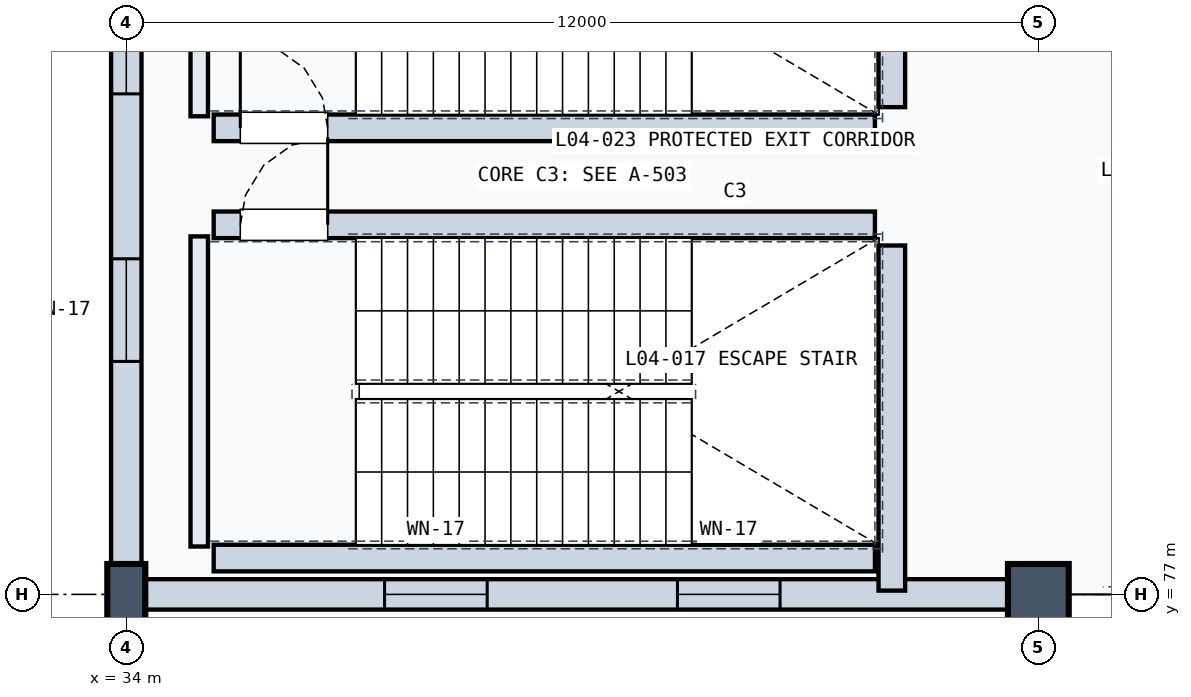
"""IFC4 building model, lengths in metres.
Left out: names, types, materials, properties, quantities, classifications, styles, units other than length and angle.
Written with IfcOpenShell. Run it as: python <this file> out.ifc"""

import sys

from ifc_helpers import new_model, si_unit, direction, frame, frame_2d, origin, origin_2d, place, context, subcontext, project, spatial, rectangle, extrude, element, fill, save


model = new_model("IFC4")
c1 = context("Model", 3, precision=1e-05, world=origin(), true_north=direction((0.0, 1.0)))
c2 = subcontext(c1, "Body", "Model", "MODEL_VIEW")
j1 = project(units=[si_unit("LENGTHUNIT", "METRE"), si_unit("PLANEANGLEUNIT", "RADIAN")], contexts=[c1])
p1 = place(None, origin())
s1 = spatial("IfcSite", under=j1, at=p1, CompositionType="ELEMENT")
p2 = place(p1, origin())
s2 = spatial("IfcBuilding", under=s1, at=p2, CompositionType="ELEMENT")
p3 = place(p2, frame((0.0, 0.0, 19.5)))
s3 = spatial("IfcBuildingStorey", under=s2, at=p3, CompositionType="ELEMENT", Elevation=19.5)
p4 = place(p3, frame((34.0, 77.0, 0.0), z_axis=(0.0, 0.0, 1.0), x_axis=(1.0, 0.0, 0.0)))
e1 = element("IfcColumn", 1, at=p4, inside=s3, PredefinedType="COLUMN", context=c2, shape_type="SweptSolid", body=[
    extrude(rectangle(XDim=0.5, YDim=0.8, at=origin_2d()), origin(), (0.0, 0.0, 1.0), 4.8),
])
p5 = place(p3, frame((46.0, 77.0, 0.0), z_axis=(0.0, 0.0, 1.0), x_axis=(1.0, 0.0, 0.0)))
e2 = element("IfcColumn", 2, at=p5, inside=s3, PredefinedType="COLUMN", context=c2, shape_type="SweptSolid", body=[
    extrude(rectangle(XDim=0.8, YDim=0.8, at=origin_2d()), origin(), (0.0, 0.0, 1.0), 4.8),
])
p6 = place(p3, frame((34.22, 77.0, 0.0), z_axis=(0.0, 0.0, 1.0), x_axis=(1.0, 0.0, 0.0)))
e3 = element("IfcWall", 3, at=p6, inside=s3, PredefinedType="SOLIDWALL", context=c2, shape_type="SweptSolid", body=[
    extrude(rectangle(XDim=11.56, YDim=0.4, at=frame_2d((5.78, 0.0))), origin(), (0.0, 0.0, 1.0), 3.49),
])
p7 = place(p6, frame((3.178, 0.0, 0.8)))
e4 = element("IfcOpeningElement", 4, at=p7, cuts=e3, PredefinedType="OPENING", context=c2, shape_type="SweptSolid", body=[
    extrude(rectangle(XDim=1.35, YDim=2.1, at=frame_2d((0.675, 1.05))), frame((0.0, 0.21, 0.0), z_axis=(0.0, -1.0, 0.0), x_axis=(1.0, 0.0, 0.0)), (0.0, 0.0, 1.0), 0.42),
])
p8 = place(p6, frame((7.032, 0.0, 0.8)))
e5 = element("IfcOpeningElement", 5, at=p8, cuts=e3, PredefinedType="OPENING", context=c2, shape_type="SweptSolid", body=[
    extrude(rectangle(XDim=1.35, YDim=2.1, at=frame_2d((0.675, 1.05))), frame((0.0, 0.21, 0.0), z_axis=(0.0, -1.0, 0.0), x_axis=(1.0, 0.0, 0.0)), (0.0, 0.0, 1.0), 0.42),
])
p9 = place(p3, frame((34.0, 77.22, 0.0), z_axis=(0.0, 0.0, 1.0), x_axis=(0.0, 1.0, 0.0)))
e6 = element("IfcWall", 6, at=p9, inside=s3, PredefinedType="SOLIDWALL", context=c2, shape_type="SweptSolid", body=[
    extrude(rectangle(XDim=10.56, YDim=0.4, at=frame_2d((5.28, 0.0))), origin(), (0.0, 0.0, 1.0), 3.49),
])
p10 = place(p9, frame((2.845, 0.0, 0.8)))
e7 = element("IfcOpeningElement", 7, at=p10, cuts=e6, PredefinedType="OPENING", context=c2, shape_type="SweptSolid", body=[
    extrude(rectangle(XDim=1.35, YDim=2.1, at=frame_2d((0.675, 1.05))), frame((0.0, 0.21, 0.0), z_axis=(0.0, -1.0, 0.0), x_axis=(1.0, 0.0, 0.0)), (0.0, 0.0, 1.0), 0.42),
])
p11 = place(p9, frame((6.365, 0.0, 0.8)))
e8 = element("IfcOpeningElement", 8, at=p11, cuts=e6, PredefinedType="OPENING", context=c2, shape_type="SweptSolid", body=[
    extrude(rectangle(XDim=1.35, YDim=2.1, at=frame_2d((0.675, 1.05))), frame((0.0, 0.21, 0.0), z_axis=(0.0, -1.0, 0.0), x_axis=(1.0, 0.0, 0.0)), (0.0, 0.0, 1.0), 0.42),
])
p12 = place(p3, frame((34.96, 77.63, 0.0), z_axis=(0.0, 0.0, 1.0), x_axis=(0.0, 1.0, 0.0)))
e9 = element("IfcWall", 9, at=p12, inside=s3, PredefinedType="SOLIDWALL", context=c2, shape_type="SweptSolid", body=[
    extrude(rectangle(XDim=4.08, YDim=0.23, at=frame_2d((2.04, 0.0))), origin(), (0.0, 0.0, 1.0), 4.46),
])
p13 = place(p3, frame((44.072, 77.05, 0.0), z_axis=(0.0, 0.0, 1.0), x_axis=(0.0, 1.0, 0.0)))
e10 = element("IfcWall", 10, at=p13, inside=s3, PredefinedType="SOLIDWALL", context=c2, shape_type="SweptSolid", body=[
    extrude(rectangle(XDim=4.54, YDim=0.35, at=frame_2d((2.27, 0.0))), origin(), (0.0, 0.0, 1.0), 4.46),
])
p14 = place(p3, frame((35.15, 77.478, 0.0), z_axis=(0.0, 0.0, 1.0), x_axis=(1.0, 0.0, 0.0)))
e11 = element("IfcWall", 11, at=p14, inside=s3, PredefinedType="SOLIDWALL", context=c2, shape_type="SweptSolid", body=[
    extrude(rectangle(XDim=8.7, YDim=0.35, at=frame_2d((4.35, 0.0))), origin(), (0.0, 0.0, 1.0), 4.46),
])
p15 = place(p3, frame((35.15, 81.862, 0.0), z_axis=(0.0, 0.0, 1.0), x_axis=(1.0, 0.0, 0.0)))
e12 = element("IfcWall", 12, at=p15, inside=s3, PredefinedType="SOLIDWALL", context=c2, shape_type="SweptSolid", body=[
    extrude(rectangle(XDim=8.7, YDim=0.35, at=frame_2d((4.35, 0.0))), origin(), (0.0, 0.0, 1.0), 4.46),
])
p16 = place(p15, frame((0.35, 0.0, 0.0)))
e13 = element("IfcOpeningElement", 13, at=p16, cuts=e12, PredefinedType="OPENING", context=c2, shape_type="SweptSolid", body=[
    extrude(rectangle(XDim=1.15, YDim=2.2, at=frame_2d((0.575, 1.1))), frame((0.0, 0.185, 0.0), z_axis=(0.0, -1.0, 0.0), x_axis=(1.0, 0.0, 0.0)), (0.0, 0.0, 1.0), 0.37),
])
p17 = place(p3, frame((34.96, 83.29, 0.0), z_axis=(0.0, 0.0, 1.0), x_axis=(0.0, 1.0, 0.0)))
e14 = element("IfcWall", 14, at=p17, inside=s3, PredefinedType="SOLIDWALL", context=c2, shape_type="SweptSolid", body=[
    extrude(rectangle(XDim=4.08, YDim=0.23, at=frame_2d((2.04, 0.0))), origin(), (0.0, 0.0, 1.0), 4.46),
])
p18 = place(p3, frame((44.072, 83.41, 0.0), z_axis=(0.0, 0.0, 1.0), x_axis=(0.0, 1.0, 0.0)))
e15 = element("IfcWall", 15, at=p18, inside=s3, PredefinedType="SOLIDWALL", context=c2, shape_type="SweptSolid", body=[
    extrude(rectangle(XDim=3.84, YDim=0.35, at=frame_2d((1.92, 0.0))), origin(), (0.0, 0.0, 1.0), 4.46),
])
p19 = place(p3, frame((35.15, 83.138, 0.0), z_axis=(0.0, 0.0, 1.0), x_axis=(1.0, 0.0, 0.0)))
e16 = element("IfcWall", 16, at=p19, inside=s3, PredefinedType="SOLIDWALL", context=c2, shape_type="SweptSolid", body=[
    extrude(rectangle(XDim=8.7, YDim=0.35, at=frame_2d((4.35, 0.0))), origin(), (0.0, 0.0, 1.0), 4.46),
])
p20 = place(p19, frame((0.35, 0.0, 0.0)))
e17 = element("IfcOpeningElement", 17, at=p20, cuts=e16, PredefinedType="OPENING", context=c2, shape_type="SweptSolid", body=[
    extrude(rectangle(XDim=1.15, YDim=2.2, at=frame_2d((0.575, 1.1))), frame((0.0, 0.185, 0.0), z_axis=(0.0, -1.0, 0.0), x_axis=(1.0, 0.0, 0.0)), (0.0, 0.0, 1.0), 0.37),
])
p21 = place(p7, origin())
e18 = element("IfcWindow", 18, at=p21, inside=s3, PartitioningType="SINGLE_PANEL", PredefinedType="WINDOW", context=c2, shape_type="SweptSolid", body=[
    extrude(rectangle(XDim=1.35, YDim=2.1, at=frame_2d((0.675, 1.05))), frame((0.0, 0.03, 0.0), z_axis=(0.0, -1.0, 0.0), x_axis=(1.0, 0.0, 0.0)), (0.0, 0.0, 1.0), 0.06),
])
fill(e4, e18)
p22 = place(p8, origin())
e19 = element("IfcWindow", 19, at=p22, inside=s3, PartitioningType="SINGLE_PANEL", PredefinedType="WINDOW", context=c2, shape_type="SweptSolid", body=[
    extrude(rectangle(XDim=1.35, YDim=2.1, at=frame_2d((0.675, 1.05))), frame((0.0, 0.03, 0.0), z_axis=(0.0, -1.0, 0.0), x_axis=(1.0, 0.0, 0.0)), (0.0, 0.0, 1.0), 0.06),
])
fill(e5, e19)
p23 = place(p10, origin())
e20 = element("IfcWindow", 20, at=p23, inside=s3, PartitioningType="SINGLE_PANEL", PredefinedType="WINDOW", context=c2, shape_type="SweptSolid", body=[
    extrude(rectangle(XDim=1.35, YDim=2.1, at=frame_2d((0.675, 1.05))), frame((0.0, 0.03, 0.0), z_axis=(0.0, -1.0, 0.0), x_axis=(1.0, 0.0, 0.0)), (0.0, 0.0, 1.0), 0.06),
])
fill(e7, e20)
p24 = place(p11, origin())
e21 = element("IfcWindow", 21, at=p24, inside=s3, PartitioningType="SINGLE_PANEL", PredefinedType="WINDOW", context=c2, shape_type="SweptSolid", body=[
    extrude(rectangle(XDim=1.35, YDim=2.1, at=frame_2d((0.675, 1.05))), frame((0.0, 0.03, 0.0), z_axis=(0.0, -1.0, 0.0), x_axis=(1.0, 0.0, 0.0)), (0.0, 0.0, 1.0), 0.06),
])
fill(e8, e21)
p25 = place(p16, origin())
e22 = element("IfcDoor", 22, at=p25, inside=s3, OperationType="SINGLE_SWING_RIGHT", PredefinedType="DOOR", context=c2, shape_type="SweptSolid", body=[
    extrude(rectangle(XDim=1.15, YDim=2.2, at=frame_2d((0.575, 1.1))), frame((0.0, 0.025, 0.0), z_axis=(0.0, -1.0, 0.0), x_axis=(1.0, 0.0, 0.0)), (0.0, 0.0, 1.0), 0.05),
])
fill(e13, e22)
p26 = place(p20, origin())
e23 = element("IfcDoor", 23, at=p26, inside=s3, OperationType="SINGLE_SWING_LEFT", PredefinedType="DOOR", context=c2, shape_type="SweptSolid", body=[
    extrude(rectangle(XDim=1.15, YDim=2.2, at=frame_2d((0.575, 1.1))), frame((0.0, 0.025, 0.0), z_axis=(0.0, -1.0, 0.0), x_axis=(1.0, 0.0, 0.0)), (0.0, 0.0, 1.0), 0.05),
])
fill(e17, e23)
save(model, sys.argv[1])
